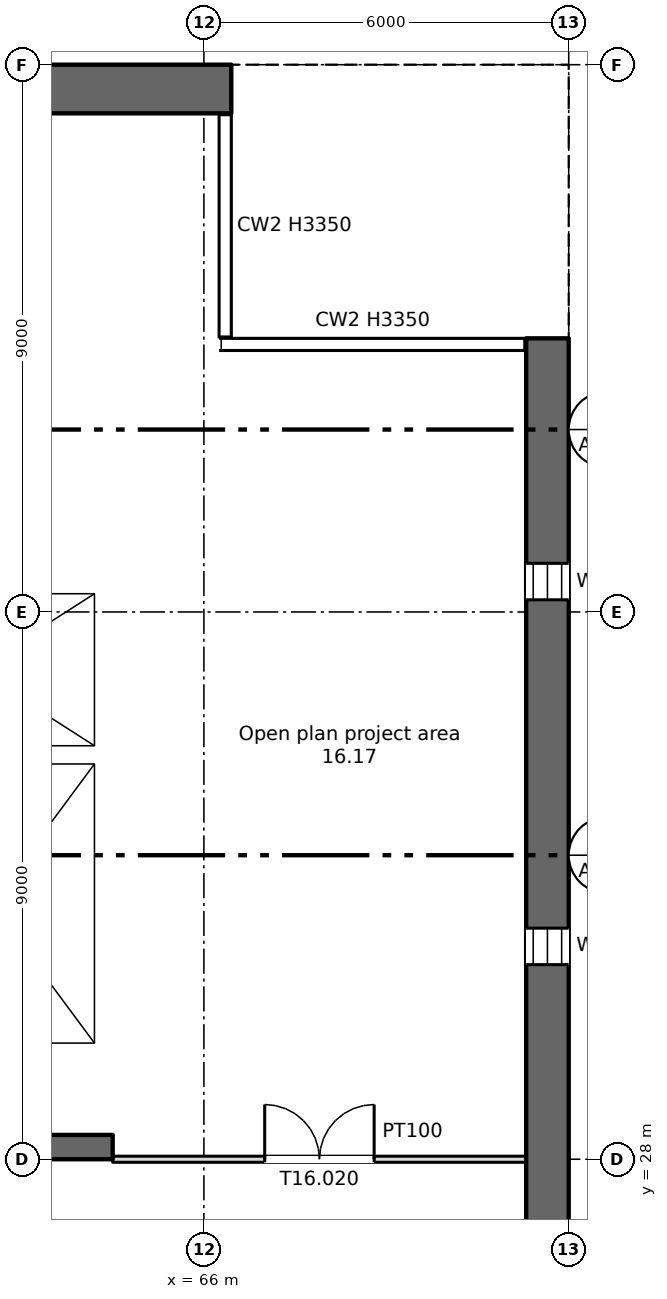
"""IFC4 building model, lengths in metres.
Left out: names, types, materials, properties, quantities, classifications, styles, units other than length and angle.
Written with IfcOpenShell. Run it as: python <this file> out.ifc"""

import sys

from ifc_helpers import new_model, si_unit, direction, frame, frame_2d, origin, place, context, subcontext, project, spatial, rectangle, extrude, element, fill, save


model = new_model("IFC4")
c1 = context("Model", 3, precision=1e-05, world=origin(), true_north=direction((0.0, 1.0)))
c2 = subcontext(c1, "Body", "Model", "MODEL_VIEW")
j1 = project(units=[si_unit("LENGTHUNIT", "METRE"), si_unit("PLANEANGLEUNIT", "RADIAN")], contexts=[c1])
p1 = place(None, origin())
s1 = spatial("IfcSite", under=j1, at=p1, CompositionType="ELEMENT")
p2 = place(p1, origin())
s2 = spatial("IfcBuilding", under=s1, at=p2, CompositionType="ELEMENT")
p3 = place(p2, frame((0.0, 0.0, 98.75)))
s3 = spatial("IfcBuildingStorey", under=s2, at=p3, CompositionType="ELEMENT", Elevation=98.75)
p4 = place(p3, frame((71.65, 6.0, 0.0), z_axis=(0.0, 0.0, 1.0), x_axis=(0.0, 1.0, 0.0)))
e1 = element("IfcWall", 1, at=p4, inside=s3, PredefinedType="SHEAR", context=c2, shape_type="SweptSolid", body=[
    extrude(rectangle(XDim=35.5, YDim=0.7, at=frame_2d((17.75, 0.0))), origin(), (0.0, 0.0, 1.0), 3.35),
])
p5 = place(p4, frame((1.2, 0.0, 0.6)))
e2 = element("IfcOpeningElement", 2, at=p5, cuts=e1, PredefinedType="OPENING", context=c2, shape_type="SweptSolid", body=[
    extrude(rectangle(XDim=0.6, YDim=2.4, at=frame_2d((0.3, 1.2))), frame((0.0, 0.36, 0.0), z_axis=(0.0, -1.0, 0.0), x_axis=(1.0, 0.0, 0.0)), (0.0, 0.0, 1.0), 0.72),
])
p6 = place(p4, frame((7.2, 0.0, 0.6)))
e3 = element("IfcOpeningElement", 3, at=p6, cuts=e1, PredefinedType="OPENING", context=c2, shape_type="SweptSolid", body=[
    extrude(rectangle(XDim=0.6, YDim=2.4, at=frame_2d((0.3, 1.2))), frame((0.0, 0.36, 0.0), z_axis=(0.0, -1.0, 0.0), x_axis=(1.0, 0.0, 0.0)), (0.0, 0.0, 1.0), 0.72),
])
p7 = place(p4, frame((13.2, 0.0, 0.6)))
e4 = element("IfcOpeningElement", 4, at=p7, cuts=e1, PredefinedType="OPENING", context=c2, shape_type="SweptSolid", body=[
    extrude(rectangle(XDim=0.6, YDim=2.4, at=frame_2d((0.3, 1.2))), frame((0.0, 0.36, 0.0), z_axis=(0.0, -1.0, 0.0), x_axis=(1.0, 0.0, 0.0)), (0.0, 0.0, 1.0), 0.72),
])
p8 = place(p4, frame((19.2, 0.0, 0.6)))
e5 = element("IfcOpeningElement", 5, at=p8, cuts=e1, PredefinedType="OPENING", context=c2, shape_type="SweptSolid", body=[
    extrude(rectangle(XDim=0.6, YDim=2.4, at=frame_2d((0.3, 1.2))), frame((0.0, 0.36, 0.0), z_axis=(0.0, -1.0, 0.0), x_axis=(1.0, 0.0, 0.0)), (0.0, 0.0, 1.0), 0.72),
])
p9 = place(p4, frame((25.2, 0.0, 0.6)))
e6 = element("IfcOpeningElement", 6, at=p9, cuts=e1, PredefinedType="OPENING", context=c2, shape_type="SweptSolid", body=[
    extrude(rectangle(XDim=0.6, YDim=2.4, at=frame_2d((0.3, 1.2))), frame((0.0, 0.36, 0.0), z_axis=(0.0, -1.0, 0.0), x_axis=(1.0, 0.0, 0.0)), (0.0, 0.0, 1.0), 0.72),
])
p10 = place(p4, frame((31.2, 0.0, 0.6)))
e7 = element("IfcOpeningElement", 7, at=p10, cuts=e1, PredefinedType="OPENING", context=c2, shape_type="SweptSolid", body=[
    extrude(rectangle(XDim=0.6, YDim=2.4, at=frame_2d((0.3, 1.2))), frame((0.0, 0.36, 0.0), z_axis=(0.0, -1.0, 0.0), x_axis=(1.0, 0.0, 0.0)), (0.0, 0.0, 1.0), 0.72),
])
p11 = place(p3, frame((5.55, 45.6, 0.0), z_axis=(0.0, 0.0, 1.0), x_axis=(1.0, 0.0, 0.0)))
e8 = element("IfcWall", 8, at=p11, inside=s3, PredefinedType="SHEAR", context=c2, shape_type="SweptSolid", body=[
    extrude(rectangle(XDim=60.9, YDim=0.8, at=frame_2d((30.45, 0.0))), origin(), (0.0, 0.0, 1.0), 3.35),
])
p12 = place(p11, frame((1.2, 0.0, 0.6)))
e9 = element("IfcOpeningElement", 9, at=p12, cuts=e8, PredefinedType="OPENING", context=c2, shape_type="SweptSolid", body=[
    extrude(rectangle(XDim=0.6, YDim=2.4, at=frame_2d((0.3, 1.2))), frame((0.0, 0.41, 0.0), z_axis=(0.0, -1.0, 0.0), x_axis=(1.0, 0.0, 0.0)), (0.0, 0.0, 1.0), 0.82),
])
p13 = place(p11, frame((7.2, 0.0, 0.6)))
e10 = element("IfcOpeningElement", 10, at=p13, cuts=e8, PredefinedType="OPENING", context=c2, shape_type="SweptSolid", body=[
    extrude(rectangle(XDim=0.6, YDim=2.4, at=frame_2d((0.3, 1.2))), frame((0.0, 0.41, 0.0), z_axis=(0.0, -1.0, 0.0), x_axis=(1.0, 0.0, 0.0)), (0.0, 0.0, 1.0), 0.82),
])
p14 = place(p3, frame((6.7, 28.2, 0.0), z_axis=(0.0, 0.0, 1.0), x_axis=(1.0, 0.0, 0.0)))
e11 = element("IfcWall", 11, at=p14, inside=s3, PredefinedType="SHEAR", context=c2, shape_type="SweptSolid", body=[
    extrude(rectangle(XDim=57.8, YDim=0.4, at=frame_2d((28.9, 0.0))), origin(), (0.0, 0.0, 1.0), 3.35),
])
p15 = place(p14, frame((13.85, 0.0, 0.0)))
e12 = element("IfcOpeningElement", 12, at=p15, cuts=e11, PredefinedType="OPENING", context=c2, shape_type="SweptSolid", body=[
    extrude(rectangle(XDim=0.9, YDim=2.1, at=frame_2d((0.45, 1.05))), frame((0.0, 0.21, 0.0), z_axis=(0.0, -1.0, 0.0), x_axis=(1.0, 0.0, 0.0)), (0.0, 0.0, 1.0), 0.42),
])
p16 = place(p14, frame((48.562, 0.0, 0.0)))
e13 = element("IfcOpeningElement", 13, at=p16, cuts=e11, PredefinedType="OPENING", context=c2, shape_type="SweptSolid", body=[
    extrude(rectangle(XDim=0.9, YDim=2.1, at=frame_2d((0.45, 1.05))), frame((0.0, 0.21, 0.0), z_axis=(0.0, -1.0, 0.0), x_axis=(1.0, 0.0, 0.0)), (0.0, 0.0, 1.0), 0.42),
])
p17 = place(p14, frame((51.137, 0.0, 0.0)))
e14 = element("IfcOpeningElement", 14, at=p17, cuts=e11, PredefinedType="OPENING", context=c2, shape_type="SweptSolid", body=[
    extrude(rectangle(XDim=0.9, YDim=2.1, at=frame_2d((0.45, 1.05))), frame((0.0, 0.21, 0.0), z_axis=(0.0, -1.0, 0.0), x_axis=(1.0, 0.0, 0.0)), (0.0, 0.0, 1.0), 0.42),
])
p18 = place(p14, frame((1.35, 0.0, 0.0)))
e15 = element("IfcOpeningElement", 15, at=p18, cuts=e11, PredefinedType="OPENING", context=c2, shape_type="SweptSolid", body=[
    extrude(rectangle(XDim=0.9, YDim=2.1, at=frame_2d((0.45, 1.05))), frame((0.0, 0.21, 0.0), z_axis=(0.0, -1.0, 0.0), x_axis=(1.0, 0.0, 0.0)), (0.0, 0.0, 1.0), 0.42),
])
p19 = place(p14, frame((4.7, 0.0, 0.0)))
e16 = element("IfcOpeningElement", 16, at=p19, cuts=e11, PredefinedType="OPENING", context=c2, shape_type="SweptSolid", body=[
    extrude(rectangle(XDim=1.2, YDim=2.1, at=frame_2d((0.6, 1.05))), frame((0.0, 0.21, 0.0), z_axis=(0.0, -1.0, 0.0), x_axis=(1.0, 0.0, 0.0)), (0.0, 0.0, 1.0), 0.42),
])
p20 = place(p14, frame((31.7, 0.0, 0.0)))
e17 = element("IfcOpeningElement", 17, at=p20, cuts=e11, PredefinedType="OPENING", context=c2, shape_type="SweptSolid", body=[
    extrude(rectangle(XDim=1.2, YDim=2.1, at=frame_2d((0.6, 1.05))), frame((0.0, 0.21, 0.0), z_axis=(0.0, -1.0, 0.0), x_axis=(1.0, 0.0, 0.0)), (0.0, 0.0, 1.0), 0.42),
])
p21 = place(p14, frame((55.2, 0.0, 0.0)))
e18 = element("IfcOpeningElement", 18, at=p21, cuts=e11, PredefinedType="OPENING", context=c2, shape_type="SweptSolid", body=[
    extrude(rectangle(XDim=1.2, YDim=2.1, at=frame_2d((0.6, 1.05))), frame((0.0, 0.21, 0.0), z_axis=(0.0, -1.0, 0.0), x_axis=(1.0, 0.0, 0.0)), (0.0, 0.0, 1.0), 0.42),
])
p22 = place(p14, frame((21.7, 0.0, 0.0)))
e19 = element("IfcOpeningElement", 19, at=p22, cuts=e11, PredefinedType="OPENING", context=c2, shape_type="SweptSolid", body=[
    extrude(rectangle(XDim=1.2, YDim=2.1, at=frame_2d((0.6, 1.05))), frame((0.0, 0.21, 0.0), z_axis=(0.0, -1.0, 0.0), x_axis=(1.0, 0.0, 0.0)), (0.0, 0.0, 1.0), 0.42),
])
p23 = place(p14, frame((41.7, 0.0, 0.0)))
e20 = element("IfcOpeningElement", 20, at=p23, cuts=e11, PredefinedType="OPENING", context=c2, shape_type="SweptSolid", body=[
    extrude(rectangle(XDim=1.2, YDim=2.1, at=frame_2d((0.6, 1.05))), frame((0.0, 0.21, 0.0), z_axis=(0.0, -1.0, 0.0), x_axis=(1.0, 0.0, 0.0)), (0.0, 0.0, 1.0), 0.42),
])
p24 = place(p14, frame((24.85, 0.0, 0.0)))
e21 = element("IfcOpeningElement", 21, at=p24, cuts=e11, PredefinedType="OPENING", context=c2, shape_type="SweptSolid", body=[
    extrude(rectangle(XDim=2.4, YDim=2.1, at=frame_2d((1.2, 1.05))), frame((0.0, 0.21, 0.0), z_axis=(0.0, -1.0, 0.0), x_axis=(1.0, 0.0, 0.0)), (0.0, 0.0, 1.0), 0.42),
])
p25 = place(p14, frame((37.35, 0.0, 0.0)))
e22 = element("IfcOpeningElement", 22, at=p25, cuts=e11, PredefinedType="OPENING", context=c2, shape_type="SweptSolid", body=[
    extrude(rectangle(XDim=2.4, YDim=2.1, at=frame_2d((1.2, 1.05))), frame((0.0, 0.21, 0.0), z_axis=(0.0, -1.0, 0.0), x_axis=(1.0, 0.0, 0.0)), (0.0, 0.0, 1.0), 0.42),
])
p26 = place(p14, frame((7.95, 0.0, 0.0)))
e23 = element("IfcOpeningElement", 23, at=p26, cuts=e11, PredefinedType="OPENING", context=c2, shape_type="SweptSolid", body=[
    extrude(rectangle(XDim=2.4, YDim=2.1, at=frame_2d((1.2, 1.05))), frame((0.0, 0.21, 0.0), z_axis=(0.0, -1.0, 0.0), x_axis=(1.0, 0.0, 0.0)), (0.0, 0.0, 1.0), 0.42),
])
p27 = place(p14, frame((28.85, 0.0, 0.0)))
e24 = element("IfcOpeningElement", 24, at=p27, cuts=e11, PredefinedType="OPENING", context=c2, shape_type="SweptSolid", body=[
    extrude(rectangle(XDim=0.9, YDim=2.1, at=frame_2d((0.45, 1.05))), frame((0.0, 0.21, 0.0), z_axis=(0.0, -1.0, 0.0), x_axis=(1.0, 0.0, 0.0)), (0.0, 0.0, 1.0), 0.42),
])
p28 = place(p14, frame((34.85, 0.0, 0.0)))
e25 = element("IfcOpeningElement", 25, at=p28, cuts=e11, PredefinedType="OPENING", context=c2, shape_type="SweptSolid", body=[
    extrude(rectangle(XDim=0.9, YDim=2.1, at=frame_2d((0.45, 1.05))), frame((0.0, 0.21, 0.0), z_axis=(0.0, -1.0, 0.0), x_axis=(1.0, 0.0, 0.0)), (0.0, 0.0, 1.0), 0.42),
])
p29 = place(p3, frame((64.35, 34.8, 0.0), z_axis=(0.0, 0.0, 1.0), x_axis=(0.0, 1.0, 0.0)))
e26 = element("IfcWall", 26, at=p29, inside=s3, PredefinedType="SHEAR", context=c2, shape_type="SweptSolid", body=[
    extrude(rectangle(XDim=10.4, YDim=0.3, at=frame_2d((5.2, 0.0))), origin(), (0.0, 0.0, 1.0), 3.35),
])
p30 = place(p3, frame((64.35, 28.4, 0.0), z_axis=(0.0, 0.0, 1.0), x_axis=(0.0, 1.0, 0.0)))
e27 = element("IfcWall", 27, at=p30, inside=s3, PredefinedType="SHEAR", context=c2, shape_type="SweptSolid", body=[
    extrude(rectangle(XDim=6.1, YDim=0.3, at=frame_2d((3.05, 0.0))), origin(), (0.0, 0.0, 1.0), 3.35),
])
p31 = place(p3, frame((60.3, 34.65, 0.0), z_axis=(0.0, 0.0, 1.0), x_axis=(1.0, 0.0, 0.0)))
e28 = element("IfcWall", 28, at=p31, inside=s3, PredefinedType="SHEAR", context=c2, shape_type="SweptSolid", body=[
    extrude(rectangle(XDim=4.2, YDim=0.3, at=frame_2d((2.1, 0.0))), origin(), (0.0, 0.0, 1.0), 3.35),
])
p32 = place(p3, frame((60.3, 37.45, 0.0), z_axis=(0.0, 0.0, 1.0), x_axis=(1.0, 0.0, 0.0)))
e29 = element("IfcWall", 29, at=p32, inside=s3, PredefinedType="SHEAR", context=c2, shape_type="SweptSolid", body=[
    extrude(rectangle(XDim=3.9, YDim=0.3, at=frame_2d((1.95, 0.0))), origin(), (0.0, 0.0, 1.0), 3.35),
])
p33 = place(p32, frame((1.4, 0.0, 0.0)))
e30 = element("IfcOpeningElement", 30, at=p33, cuts=e29, PredefinedType="OPENING", context=c2, shape_type="SweptSolid", body=[
    extrude(rectangle(XDim=1.1, YDim=2.1, at=frame_2d((0.55, 1.05))), frame((0.0, 0.16, 0.0), z_axis=(0.0, -1.0, 0.0), x_axis=(1.0, 0.0, 0.0)), (0.0, 0.0, 1.0), 0.32),
])
p34 = place(p3, frame((64.5, 28.0, 0.0), z_axis=(0.0, 0.0, 1.0), x_axis=(1.0, 0.0, 0.0)))
e31 = element("IfcWall", 31, at=p34, inside=s3, PredefinedType="PARTITIONING", context=c2, shape_type="SweptSolid", body=[
    extrude(rectangle(XDim=6.8, YDim=0.1, at=frame_2d((3.4, 0.0))), origin(), (0.0, 0.0, 1.0), 3.35),
])
p35 = place(p34, frame((2.5, 0.0, 0.0)))
e32 = element("IfcOpeningElement", 32, at=p35, cuts=e31, PredefinedType="OPENING", context=c2, shape_type="SweptSolid", body=[
    extrude(rectangle(XDim=1.8, YDim=2.1, at=frame_2d((0.9, 1.05))), frame((0.0, 0.06, 0.0), z_axis=(0.0, -1.0, 0.0), x_axis=(1.0, 0.0, 0.0)), (0.0, 0.0, 1.0), 0.12),
])
p36 = place(p9, origin())
e33 = element("IfcWindow", 33, at=p36, inside=s3, PartitioningType="SINGLE_PANEL", PredefinedType="WINDOW", context=c2, shape_type="SweptSolid", body=[
    extrude(rectangle(XDim=0.6, YDim=2.4, at=frame_2d((0.3, 1.2))), frame((0.0, 0.03, 0.0), z_axis=(0.0, -1.0, 0.0), x_axis=(1.0, 0.0, 0.0)), (0.0, 0.0, 1.0), 0.06),
])
fill(e6, e33)
p37 = place(p10, origin())
e34 = element("IfcWindow", 34, at=p37, inside=s3, PartitioningType="SINGLE_PANEL", PredefinedType="WINDOW", context=c2, shape_type="SweptSolid", body=[
    extrude(rectangle(XDim=0.6, YDim=2.4, at=frame_2d((0.3, 1.2))), frame((0.0, 0.03, 0.0), z_axis=(0.0, -1.0, 0.0), x_axis=(1.0, 0.0, 0.0)), (0.0, 0.0, 1.0), 0.06),
])
fill(e7, e34)
p38 = place(p35, origin())
e35 = element("IfcDoor", 35, at=p38, inside=s3, OperationType="DOUBLE_DOOR_SINGLE_SWING", PredefinedType="DOOR", context=c2, shape_type="SweptSolid", body=[
    extrude(rectangle(XDim=1.8, YDim=2.1, at=frame_2d((0.9, 1.05))), frame((0.0, 0.025, 0.0), z_axis=(0.0, -1.0, 0.0), x_axis=(1.0, 0.0, 0.0)), (0.0, 0.0, 1.0), 0.05),
])
fill(e32, e35)
save(model, sys.argv[1])
